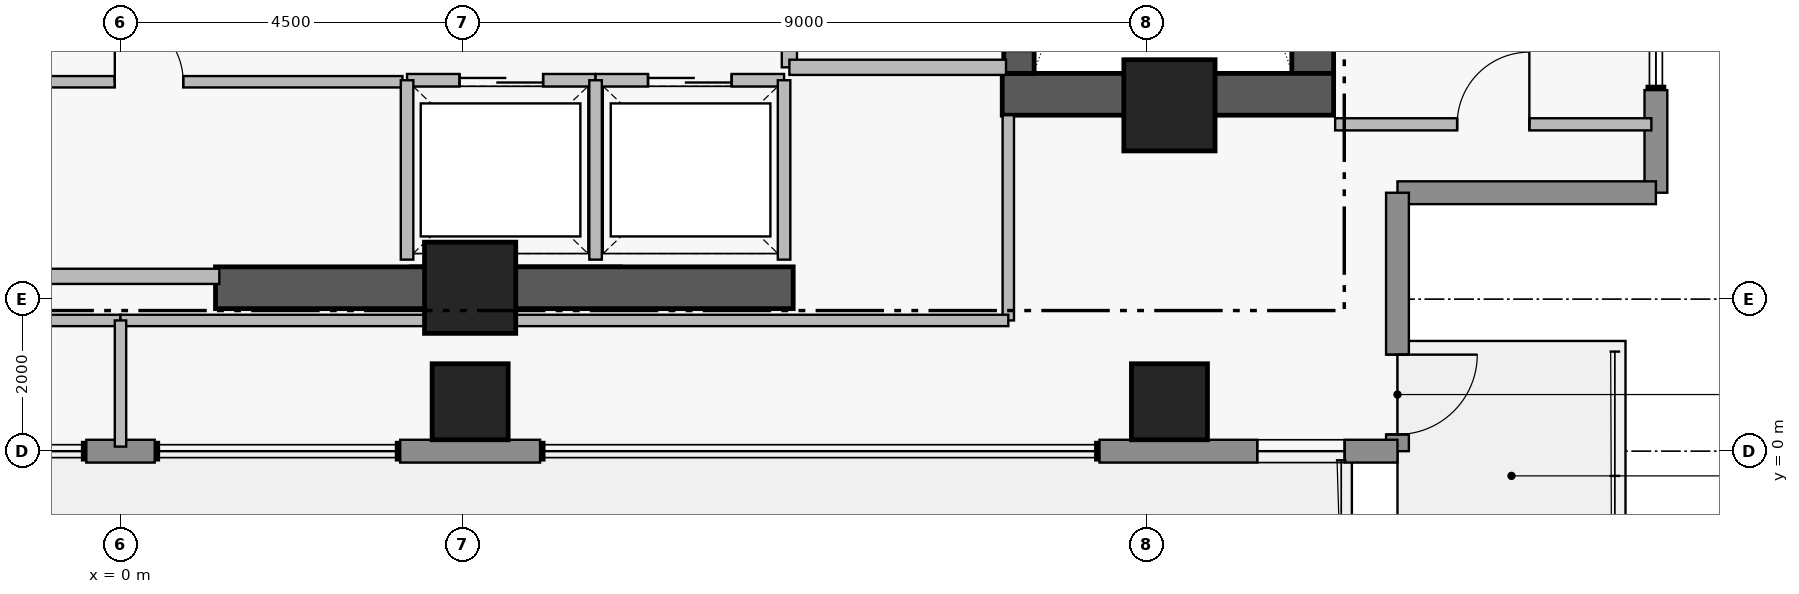
"""IFC4 building model, lengths in metres.
Left out: names, types, materials, properties, quantities, classifications, styles, units other than length and angle.
Written with IfcOpenShell. Run it as: python <this file> out.ifc"""

import sys

from ifc_helpers import new_model, si_unit, direction, frame, frame_2d, origin, origin_2d, place, context, subcontext, project, spatial, rectangle, extrude, element, fill, save


model = new_model("IFC4")
c1 = context("Model", 3, precision=1e-05, world=origin(), true_north=direction((0.0, 1.0)))
c2 = subcontext(c1, "Body", "Model", "MODEL_VIEW")
j1 = project(units=[si_unit("LENGTHUNIT", "METRE"), si_unit("PLANEANGLEUNIT", "RADIAN")], contexts=[c1])
p1 = place(None, origin())
s1 = spatial("IfcSite", under=j1, at=p1, CompositionType="ELEMENT")
p2 = place(p1, origin())
s2 = spatial("IfcBuilding", under=s1, at=p2, CompositionType="ELEMENT")
p3 = place(p2, frame((0.0, 0.0, 250.75)))
s3 = spatial("IfcBuildingStorey", under=s2, at=p3, CompositionType="ELEMENT", Elevation=250.75)
p4 = place(p3, frame((15.685, 4.97, 0.0), z_axis=(0.0, 0.0, 1.0), x_axis=(0.0, 1.0, 0.0)))
e1 = element("IfcWall", 1, at=p4, inside=s3, PredefinedType="SHEAR", context=c2, shape_type="SweptSolid", body=[
    extrude(rectangle(XDim=8.96, YDim=0.55, at=frame_2d((4.48, 0.0))), origin(), (0.0, 0.0, 1.0), 3.51),
])
p5 = place(p3, frame((11.6, 4.695, 0.0), z_axis=(0.0, 0.0, 1.0), x_axis=(1.0, 0.0, 0.0)))
e2 = element("IfcWall", 2, at=p5, inside=s3, PredefinedType="SHEAR", context=c2, shape_type="SweptSolid", body=[
    extrude(rectangle(XDim=4.36, YDim=0.55, at=frame_2d((2.18, 0.0))), origin(), (0.0, 0.0, 1.0), 3.51),
])
p6 = place(p3, frame((1.25, 2.15, 0.0), z_axis=(0.0, 0.0, 1.0), x_axis=(1.0, 0.0, 0.0)))
e3 = element("IfcWall", 3, at=p6, inside=s3, PredefinedType="SHEAR", context=c2, shape_type="SweptSolid", body=[
    extrude(rectangle(XDim=7.6, YDim=0.55, at=frame_2d((3.8, 0.0))), origin(), (0.0, 0.0, 1.0), 3.48),
])
p7 = place(p3, frame((11.82, 13.93, 0.0), z_axis=(0.0, 0.0, 1.0), x_axis=(0.0, -1.0, 0.0)))
e4 = element("IfcWall", 4, at=p7, inside=s3, PredefinedType="SHEAR", context=c2, shape_type="SweptSolid", body=[
    extrude(rectangle(XDim=8.96, YDim=0.4, at=frame_2d((4.48, 0.0))), origin(), (0.0, 0.0, 1.0), 3.51),
])
p8 = place(p7, frame((7.53, 0.0, 0.0)))
e5 = element("IfcOpeningElement", 5, at=p8, cuts=e4, PredefinedType="OPENING", context=c2, shape_type="SweptSolid", body=[
    extrude(rectangle(XDim=1.12, YDim=2.22, at=frame_2d((0.56, 1.11))), frame((0.0, 0.21, 0.0), z_axis=(0.0, -1.0, 0.0), x_axis=(1.0, 0.0, 0.0)), (0.0, 0.0, 1.0), 0.42),
])
for number, where, z_axis, x_axis in (
    (6, (4.6, 2.15, 0.0), (0.0, 0.0, 1.0), (1.0, 0.0, 0.0)),
    (7, (13.8, 4.55, 0.0), (0.0, 0.0, 1.0), (1.0, 0.0, 0.0)),
):
    element("IfcColumn", number, at=place(p3, frame(where, z_axis=z_axis, x_axis=x_axis)), inside=s3, PredefinedType="COLUMN", context=c2, shape_type="SweptSolid", body=[
        extrude(rectangle(XDim=1.2, YDim=1.2, at=origin_2d()), origin(), (0.0, 0.0, 1.0), 3.7),
    ])
for number, where, z_axis, x_axis in (
    (8, (4.6, 0.65, 0.0), (0.0, 0.0, 1.0), (1.0, 0.0, 0.0)),
    (9, (13.8, 0.65, 0.0), (0.0, 0.0, 1.0), (1.0, 0.0, 0.0)),
):
    element("IfcColumn", number, at=place(p3, frame(where, z_axis=z_axis, x_axis=x_axis)), inside=s3, PredefinedType="COLUMN", context=c2, shape_type="SweptSolid", body=[
        extrude(rectangle(XDim=1.0, YDim=1.0, at=origin_2d()), origin(), (0.0, 0.0, 1.0), 3.7),
    ])
p9 = place(p3, frame((20.2, 4.75, 0.0), z_axis=(0.0, 0.0, 1.0), x_axis=(0.0, -1.0, 0.0)))
e10 = element("IfcWall", 10, at=p9, inside=s3, PredefinedType="STANDARD", context=c2, shape_type="SweptSolid", body=[
    extrude(rectangle(XDim=1.35, YDim=0.3, at=frame_2d((0.675, 0.0))), origin(), (0.0, 0.0, 1.0), 3.48),
])
p10 = place(p3, frame((20.2, 3.4, 0.0), z_axis=(0.0, 0.0, 1.0), x_axis=(-1.0, 0.0, 0.0)))
e11 = element("IfcWall", 11, at=p10, inside=s3, PredefinedType="STANDARD", context=c2, shape_type="SweptSolid", body=[
    extrude(rectangle(XDim=3.4, YDim=0.3, at=frame_2d((1.7, 0.0))), origin(), (0.0, 0.0, 1.0), 3.48),
])
p11 = place(p3, frame((16.8, 3.4, 0.0), z_axis=(0.0, 0.0, 1.0), x_axis=(0.0, -1.0, 0.0)))
e12 = element("IfcWall", 12, at=p11, inside=s3, PredefinedType="STANDARD", context=c2, shape_type="SweptSolid", body=[
    extrude(rectangle(XDim=3.4, YDim=0.3, at=frame_2d((1.7, 0.0))), origin(), (0.0, 0.0, 1.0), 3.48),
])
p12 = place(p11, frame((2.13, 0.0, 0.0)))
e13 = element("IfcOpeningElement", 13, at=p12, cuts=e12, PredefinedType="OPENING", context=c2, shape_type="SweptSolid", body=[
    extrude(rectangle(XDim=1.05, YDim=2.2, at=frame_2d((0.525, 1.1))), frame((0.0, 0.16, 0.0), z_axis=(0.0, -1.0, 0.0), x_axis=(1.0, 0.0, 0.0)), (0.0, 0.0, 1.0), 0.32),
])
p13 = place(p3, frame((16.8, 0.0, 0.0), z_axis=(0.0, 0.0, 1.0), x_axis=(-1.0, 0.0, 0.0)))
e14 = element("IfcWall", 14, at=p13, inside=s3, PredefinedType="STANDARD", context=c2, shape_type="SweptSolid", body=[
    extrude(rectangle(XDim=3.92, YDim=0.3, at=frame_2d((1.96, 0.0))), origin(), (0.0, 0.0, 1.0), 3.48),
])
p14 = place(p13, frame((0.695, 0.0, 0.95)))
e15 = element("IfcOpeningElement", 15, at=p14, cuts=e14, PredefinedType="OPENING", context=c2, shape_type="SweptSolid", body=[
    extrude(rectangle(XDim=1.15, YDim=1.55, at=frame_2d((0.575, 0.775))), frame((0.0, 0.16, 0.0), z_axis=(0.0, -1.0, 0.0), x_axis=(1.0, 0.0, 0.0)), (0.0, 0.0, 1.0), 0.32),
])
p15 = place(p3, frame((5.52, 0.0, 0.0), z_axis=(0.0, 0.0, 1.0), x_axis=(-1.0, 0.0, 0.0)))
e16 = element("IfcWall", 16, at=p15, inside=s3, PredefinedType="STANDARD", context=c2, shape_type="SweptSolid", body=[
    extrude(rectangle(XDim=1.84, YDim=0.3, at=frame_2d((0.92, 0.0))), origin(), (0.0, 0.0, 1.0), 3.48),
])
p16 = place(p3, frame((0.45, 0.0, 0.0), z_axis=(0.0, 0.0, 1.0), x_axis=(-1.0, 0.0, 0.0)))
e17 = element("IfcWall", 17, at=p16, inside=s3, PredefinedType="STANDARD", context=c2, shape_type="SweptSolid", body=[
    extrude(rectangle(XDim=0.9, YDim=0.3, at=frame_2d((0.45, 0.0))), origin(), (0.0, 0.0, 1.0), 3.48),
])
p17 = place(p3, frame((8.8, 11.15, 0.0), z_axis=(0.0, 0.0, 1.0), x_axis=(0.0, -1.0, 0.0)))
e18 = element("IfcWall", 18, at=p17, inside=s3, PredefinedType="PARTITIONING", context=c2, shape_type="SweptSolid", body=[
    extrude(rectangle(XDim=6.1, YDim=0.2, at=frame_2d((3.05, 0.0))), origin(), (0.0, 0.0, 1.0), 3.48),
])
p18 = place(p17, frame((1.15, 0.0, 0.0)))
e19 = element("IfcOpeningElement", 19, at=p18, cuts=e18, PredefinedType="OPENING", context=c2, shape_type="SweptSolid", body=[
    extrude(rectangle(XDim=1.1, YDim=2.2, at=frame_2d((0.55, 1.1))), frame((0.0, 0.11, 0.0), z_axis=(0.0, -1.0, 0.0), x_axis=(1.0, 0.0, 0.0)), (0.0, 0.0, 1.0), 0.22),
])
p19 = place(p17, frame((4.75, 0.0, 0.0)))
e20 = element("IfcOpeningElement", 20, at=p19, cuts=e18, PredefinedType="OPENING", context=c2, shape_type="SweptSolid", body=[
    extrude(rectangle(XDim=1.1, YDim=2.2, at=frame_2d((0.55, 1.1))), frame((0.0, 0.11, 0.0), z_axis=(0.0, -1.0, 0.0), x_axis=(1.0, 0.0, 0.0)), (0.0, 0.0, 1.0), 0.22),
])
p20 = place(p3, frame((3.77, 4.88, 0.0), z_axis=(0.0, 0.0, 1.0), x_axis=(1.0, 0.0, 0.0)))
e21 = element("IfcWall", 21, at=p20, inside=s3, PredefinedType="PARTITIONING", context=c2, shape_type="SweptSolid", body=[
    extrude(rectangle(XDim=2.48, YDim=0.165, at=frame_2d((1.24, 0.0))), origin(), (0.0, 0.0, 1.0), 3.48),
])
p21 = place(p20, frame((0.69, 0.0, 0.0)))
e22 = element("IfcOpeningElement", 22, at=p21, cuts=e21, PredefinedType="OPENING", context=c2, shape_type="SweptSolid", body=[
    extrude(rectangle(XDim=1.1, YDim=2.25, at=frame_2d((0.55, 1.125))), frame((0.0, 0.093, 0.0), z_axis=(0.0, -1.0, 0.0), x_axis=(1.0, 0.0, 0.0)), (0.0, 0.0, 1.0), 0.185),
])
p22 = place(p3, frame((6.25, 4.88, 0.0), z_axis=(0.0, 0.0, 1.0), x_axis=(1.0, 0.0, 0.0)))
e23 = element("IfcWall", 23, at=p22, inside=s3, PredefinedType="PARTITIONING", context=c2, shape_type="SweptSolid", body=[
    extrude(rectangle(XDim=2.48, YDim=0.165, at=frame_2d((1.24, 0.0))), origin(), (0.0, 0.0, 1.0), 3.48),
])
p23 = place(p22, frame((0.69, 0.0, 0.0)))
e24 = element("IfcOpeningElement", 24, at=p23, cuts=e23, PredefinedType="OPENING", context=c2, shape_type="SweptSolid", body=[
    extrude(rectangle(XDim=1.1, YDim=2.25, at=frame_2d((0.55, 1.125))), frame((0.0, 0.093, 0.0), z_axis=(0.0, -1.0, 0.0), x_axis=(1.0, 0.0, 0.0)), (0.0, 0.0, 1.0), 0.185),
])
p24 = place(p3, frame((-2.96, 4.86, 0.0), z_axis=(0.0, 0.0, 1.0), x_axis=(1.0, 0.0, 0.0)))
e25 = element("IfcWall", 25, at=p24, inside=s3, PredefinedType="PARTITIONING", context=c2, shape_type="SweptSolid", body=[
    extrude(rectangle(XDim=6.67, YDim=0.15, at=frame_2d((3.335, 0.0))), origin(), (0.0, 0.0, 1.0), 3.48),
])
p25 = place(p24, frame((2.885, 0.0, 0.0)))
e26 = element("IfcOpeningElement", 26, at=p25, cuts=e25, PredefinedType="OPENING", context=c2, shape_type="SweptSolid", body=[
    extrude(rectangle(XDim=0.9, YDim=2.15, at=frame_2d((0.45, 1.075))), frame((0.0, 0.085, 0.0), z_axis=(0.0, -1.0, 0.0), x_axis=(1.0, 0.0, 0.0)), (0.0, 0.0, 1.0), 0.17),
])
p26 = place(p3, frame((15.98, 4.3, 0.0), z_axis=(0.0, 0.0, 1.0), x_axis=(1.0, 0.0, 0.0)))
e27 = element("IfcWall", 27, at=p26, inside=s3, PredefinedType="PARTITIONING", context=c2, shape_type="SweptSolid", body=[
    extrude(rectangle(XDim=4.16, YDim=0.16, at=frame_2d((2.08, 0.0))), origin(), (0.0, 0.0, 1.0), 3.48),
])
p27 = place(p26, frame((1.605, 0.0, 0.0)))
e28 = element("IfcOpeningElement", 28, at=p27, cuts=e27, PredefinedType="OPENING", context=c2, shape_type="SweptSolid", body=[
    extrude(rectangle(XDim=0.95, YDim=2.15, at=frame_2d((0.475, 1.075))), frame((0.0, 0.09, 0.0), z_axis=(0.0, -1.0, 0.0), x_axis=(1.0, 0.0, 0.0)), (0.0, 0.0, 1.0), 0.18),
])
p28 = place(p3, frame((8.8, 5.05, 0.0), z_axis=(0.0, 0.0, 1.0), x_axis=(1.0, 0.0, 0.0)))
e29 = element("IfcWall", 29, at=p28, inside=s3, PredefinedType="PARTITIONING", context=c2, shape_type="SweptSolid", body=[
    extrude(rectangle(XDim=2.85, YDim=0.2, at=frame_2d((1.425, 0.0))), origin(), (0.0, 0.0, 1.0), 3.48),
])
for number, where, z_axis, x_axis in (
    (30, (3.77, 2.52, 0.0), (0.0, 0.0, 1.0), (0.0, 1.0, 0.0)),
    (31, (6.25, 2.52, 0.0), (0.0, 0.0, 1.0), (0.0, 1.0, 0.0)),
    (32, (8.73, 2.52, 0.0), (0.0, 0.0, 1.0), (0.0, 1.0, 0.0)),
):
    element("IfcWall", number, at=place(p3, frame(where, z_axis=z_axis, x_axis=x_axis)), inside=s3, PredefinedType="PARTITIONING", context=c2, shape_type="SweptSolid", body=[
        extrude(rectangle(XDim=2.36, YDim=0.165, at=frame_2d((1.18, 0.0))), origin(), (0.0, 0.0, 1.0), 3.48),
    ])
p29 = place(p3, frame((-1.3, 2.3, 0.0), z_axis=(0.0, 0.0, 1.0), x_axis=(1.0, 0.0, 0.0)))
e33 = element("IfcWall", 33, at=p29, inside=s3, PredefinedType="PARTITIONING", context=c2, shape_type="SweptSolid", body=[
    extrude(rectangle(XDim=2.6, YDim=0.2, at=frame_2d((1.3, 0.0))), origin(), (0.0, 0.0, 1.0), 2.38),
])
p30 = place(p3, frame((-11.68, 1.72, 0.0), z_axis=(0.0, 0.0, 1.0), x_axis=(1.0, 0.0, 0.0)))
e34 = element("IfcWall", 34, at=p30, inside=s3, PredefinedType="PARTITIONING", context=c2, shape_type="SweptSolid", body=[
    extrude(rectangle(XDim=11.68, YDim=0.15, at=frame_2d((5.84, 0.0))), origin(), (0.0, 0.0, 1.0), 2.38),
])
p31 = place(p3, frame((11.68, 1.72, 0.0), z_axis=(0.0, 0.0, 1.0), x_axis=(0.0, 1.0, 0.0)))
e35 = element("IfcWall", 35, at=p31, inside=s3, PredefinedType="PARTITIONING", context=c2, shape_type="SweptSolid", body=[
    extrude(rectangle(XDim=2.7, YDim=0.15, at=frame_2d((1.35, 0.0))), origin(), (0.0, 0.0, 1.0), 3.48),
])
p32 = place(p3, frame((0.0, 1.72, 0.0), z_axis=(0.0, 0.0, 1.0), x_axis=(1.0, 0.0, 0.0)))
e36 = element("IfcWall", 36, at=p32, inside=s3, PredefinedType="PARTITIONING", context=c2, shape_type="SweptSolid", body=[
    extrude(rectangle(XDim=11.68, YDim=0.15, at=frame_2d((5.84, 0.0))), origin(), (0.0, 0.0, 1.0), 2.38),
])
p33 = place(p3, frame((0.0, 0.06, 0.0), z_axis=(0.0, 0.0, 1.0), x_axis=(0.0, 1.0, 0.0)))
e37 = element("IfcWall", 37, at=p33, inside=s3, PredefinedType="PARTITIONING", context=c2, shape_type="SweptSolid", body=[
    extrude(rectangle(XDim=1.66, YDim=0.15, at=frame_2d((0.83, 0.0))), origin(), (0.0, 0.0, 1.0), 3.48),
])
p34 = place(p12, origin())
e38 = element("IfcDoor", 38, at=p34, inside=s3, OperationType="SINGLE_SWING_LEFT", PredefinedType="DOOR", context=c2, shape_type="SweptSolid", body=[
    extrude(rectangle(XDim=1.05, YDim=2.2, at=frame_2d((0.525, 1.1))), frame((0.0, 0.025, 0.0), z_axis=(0.0, -1.0, 0.0), x_axis=(1.0, 0.0, 0.0)), (0.0, 0.0, 1.0), 0.05),
])
fill(e13, e38)
p35 = place(p14, origin())
e39 = element("IfcWindow", 39, at=p35, inside=s3, PartitioningType="SINGLE_PANEL", PredefinedType="WINDOW", context=c2, shape_type="SweptSolid", body=[
    extrude(rectangle(XDim=1.15, YDim=1.55, at=frame_2d((0.575, 0.775))), frame((0.0, 0.03, 0.0), z_axis=(0.0, -1.0, 0.0), x_axis=(1.0, 0.0, 0.0)), (0.0, 0.0, 1.0), 0.06),
])
fill(e15, e39)
p36 = place(p21, origin())
e40 = element("IfcDoor", 40, at=p36, inside=s3, OperationType="SLIDING_TO_LEFT", PredefinedType="DOOR", context=c2, shape_type="SweptSolid", body=[
    extrude(rectangle(XDim=1.1, YDim=2.25, at=frame_2d((0.55, 1.125))), frame((0.0, 0.025, 0.0), z_axis=(0.0, -1.0, 0.0), x_axis=(1.0, 0.0, 0.0)), (0.0, 0.0, 1.0), 0.05),
])
fill(e22, e40)
p37 = place(p23, origin())
e41 = element("IfcDoor", 41, at=p37, inside=s3, OperationType="SLIDING_TO_LEFT", PredefinedType="DOOR", context=c2, shape_type="SweptSolid", body=[
    extrude(rectangle(XDim=1.1, YDim=2.25, at=frame_2d((0.55, 1.125))), frame((0.0, 0.025, 0.0), z_axis=(0.0, -1.0, 0.0), x_axis=(1.0, 0.0, 0.0)), (0.0, 0.0, 1.0), 0.05),
])
fill(e24, e41)
p38 = place(p25, origin())
e42 = element("IfcDoor", 42, at=p38, inside=s3, OperationType="SINGLE_SWING_LEFT", PredefinedType="DOOR", context=c2, shape_type="SweptSolid", body=[
    extrude(rectangle(XDim=0.9, YDim=2.15, at=frame_2d((0.45, 1.075))), frame((0.0, 0.025, 0.0), z_axis=(0.0, -1.0, 0.0), x_axis=(1.0, 0.0, 0.0)), (0.0, 0.0, 1.0), 0.05),
])
fill(e26, e42)
p39 = place(p27, origin())
e43 = element("IfcDoor", 43, at=p39, inside=s3, OperationType="SINGLE_SWING_RIGHT", PredefinedType="DOOR", context=c2, shape_type="SweptSolid", body=[
    extrude(rectangle(XDim=0.95, YDim=2.15, at=frame_2d((0.475, 1.075))), frame((0.0, 0.025, 0.0), z_axis=(0.0, -1.0, 0.0), x_axis=(1.0, 0.0, 0.0)), (0.0, 0.0, 1.0), 0.05),
])
fill(e28, e43)
save(model, sys.argv[1])
